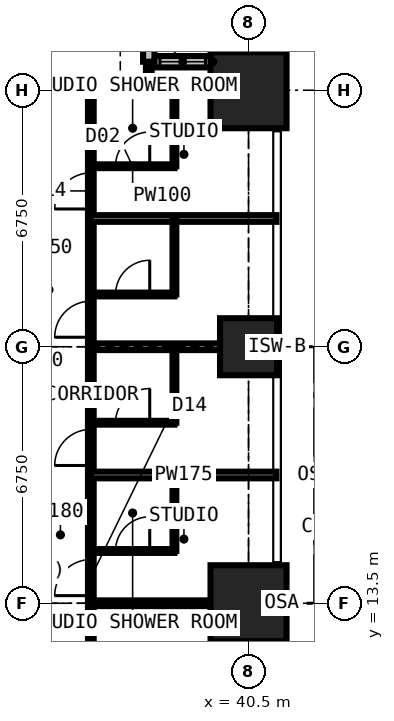
"""IFC4 building model, lengths in metres.
Left out: names, types, materials, properties, quantities, classifications, styles, units other than length and angle.
Written with IfcOpenShell. Run it as: python <this file> out.ifc"""

import sys

from ifc_helpers import new_model, si_unit, direction, frame, frame_2d, origin, origin_2d, place, context, subcontext, project, spatial, rectangle, extrude, element, fill, save


model = new_model("IFC4")
c1 = context("Model", 3, precision=1e-05, world=origin(), true_north=direction((0.0, 1.0)))
c2 = subcontext(c1, "Body", "Model", "MODEL_VIEW")
j1 = project(units=[si_unit("LENGTHUNIT", "METRE"), si_unit("PLANEANGLEUNIT", "RADIAN")], contexts=[c1])
p1 = place(None, origin())
s1 = spatial("IfcSite", under=j1, at=p1, CompositionType="ELEMENT")
p2 = place(p1, origin())
s2 = spatial("IfcBuilding", under=s1, at=p2, CompositionType="ELEMENT")
p3 = place(p2, frame((0.0, 0.0, 134.1)))
s3 = spatial("IfcBuildingStorey", under=s2, at=p3, CompositionType="ELEMENT", Elevation=134.1)
p4 = place(p3, frame((40.5, 13.5, 0.0), z_axis=(0.0, 0.0, 1.0), x_axis=(1.0, 0.0, 0.0)))
e1 = element("IfcColumn", 1, at=p4, inside=s3, PredefinedType="COLUMN", context=c2, shape_type="SweptSolid", body=[
    extrude(rectangle(XDim=2.0, YDim=2.0, at=origin_2d()), origin(), (0.0, 0.0, 1.0), 3.6),
])
p5 = place(p3, frame((40.5, 20.25, 0.0), z_axis=(0.0, 0.0, 1.0), x_axis=(1.0, 0.0, 0.0)))
e2 = element("IfcColumn", 2, at=p5, inside=s3, PredefinedType="COLUMN", context=c2, shape_type="SweptSolid", body=[
    extrude(rectangle(XDim=1.5, YDim=1.5, at=origin_2d()), origin(), (0.0, 0.0, 1.0), 3.6),
])
p6 = place(p3, frame((40.5, 27.0, 0.0), z_axis=(0.0, 0.0, 1.0), x_axis=(1.0, 0.0, 0.0)))
e3 = element("IfcColumn", 3, at=p6, inside=s3, PredefinedType="COLUMN", context=c2, shape_type="SweptSolid", body=[
    extrude(rectangle(XDim=2.0, YDim=2.0, at=origin_2d()), origin(), (0.0, 0.0, 1.0), 3.6),
])
p7 = place(p3, frame((41.25, 27.75, 0.0), z_axis=(0.0, 0.0, 1.0), x_axis=(-1.0, 0.0, 0.0)))
e4 = element("IfcWall", 4, at=p7, inside=s3, PredefinedType="SOLIDWALL", context=c2, shape_type="SweptSolid", body=[
    extrude(rectangle(XDim=3.375, YDim=0.3, at=frame_2d((1.688, 0.0))), origin(), (0.0, 0.0, 1.0), 3.3),
])
p8 = place(p7, frame((1.883, 0.0, 0.9)))
e5 = element("IfcOpeningElement", 5, at=p8, cuts=e4, PredefinedType="OPENING", context=c2, shape_type="SweptSolid", body=[
    extrude(rectangle(XDim=1.2, YDim=1.8, at=frame_2d((0.6, 0.9))), frame((0.0, 0.16, 0.0), z_axis=(0.0, -1.0, 0.0), x_axis=(1.0, 0.0, 0.0)), (0.0, 0.0, 1.0), 0.32),
])
p9 = place(p3, frame((37.875, 27.75, 0.0), z_axis=(0.0, 0.0, 1.0), x_axis=(0.0, 1.0, 0.0)))
e6 = element("IfcWall", 6, at=p9, inside=s3, PredefinedType="SOLIDWALL", context=c2, shape_type="SweptSolid", body=[
    extrude(rectangle(XDim=3.375, YDim=0.3, at=frame_2d((1.688, 0.0))), origin(), (0.0, 0.0, 1.0), 3.3),
])
p10 = place(p9, frame((0.788, 0.0, 0.6)))
e7 = element("IfcOpeningElement", 7, at=p10, cuts=e6, PredefinedType="OPENING", context=c2, shape_type="SweptSolid", body=[
    extrude(rectangle(XDim=1.8, YDim=2.1, at=frame_2d((0.9, 1.05))), frame((0.0, 0.16, 0.0), z_axis=(0.0, -1.0, 0.0), x_axis=(1.0, 0.0, 0.0)), (0.0, 0.0, 1.0), 0.32),
])
p11 = place(p3, frame((36.35, 6.75, 0.0), z_axis=(0.0, 0.0, 1.0), x_axis=(0.0, 1.0, 0.0)))
e8 = element("IfcWall", 8, at=p11, inside=s3, PredefinedType="PARTITIONING", context=c2, shape_type="SweptSolid", body=[
    extrude(rectangle(XDim=20.25, YDim=0.15, at=frame_2d((10.125, 0.0))), origin(), (0.0, 0.0, 1.0), 3.3),
])
p12 = place(p11, frame((6.95, 0.0, 0.0)))
e9 = element("IfcOpeningElement", 9, at=p12, cuts=e8, PredefinedType="OPENING", context=c2, shape_type="SweptSolid", body=[
    extrude(rectangle(XDim=0.95, YDim=2.2, at=frame_2d((0.475, 1.1))), frame((0.0, 0.085, 0.0), z_axis=(0.0, -1.0, 0.0), x_axis=(1.0, 0.0, 0.0)), (0.0, 0.0, 1.0), 0.17),
])
p13 = place(p11, frame((10.375, 0.0, 0.0)))
e10 = element("IfcOpeningElement", 10, at=p13, cuts=e8, PredefinedType="OPENING", context=c2, shape_type="SweptSolid", body=[
    extrude(rectangle(XDim=0.95, YDim=2.2, at=frame_2d((0.475, 1.1))), frame((0.0, 0.085, 0.0), z_axis=(0.0, -1.0, 0.0), x_axis=(1.0, 0.0, 0.0)), (0.0, 0.0, 1.0), 0.17),
])
p14 = place(p11, frame((13.75, 0.0, 0.0)))
e11 = element("IfcOpeningElement", 11, at=p14, cuts=e8, PredefinedType="OPENING", context=c2, shape_type="SweptSolid", body=[
    extrude(rectangle(XDim=0.95, YDim=2.2, at=frame_2d((0.475, 1.1))), frame((0.0, 0.085, 0.0), z_axis=(0.0, -1.0, 0.0), x_axis=(1.0, 0.0, 0.0)), (0.0, 0.0, 1.0), 0.17),
])
p15 = place(p11, frame((17.125, 0.0, 0.0)))
e12 = element("IfcOpeningElement", 12, at=p15, cuts=e8, PredefinedType="OPENING", context=c2, shape_type="SweptSolid", body=[
    extrude(rectangle(XDim=0.95, YDim=2.2, at=frame_2d((0.475, 1.1))), frame((0.0, 0.085, 0.0), z_axis=(0.0, -1.0, 0.0), x_axis=(1.0, 0.0, 0.0)), (0.0, 0.0, 1.0), 0.17),
])
p16 = place(p3, frame((36.35, 13.5, 0.0), z_axis=(0.0, 0.0, 1.0), x_axis=(1.0, 0.0, 0.0)))
e13 = element("IfcWall", 13, at=p16, inside=s3, PredefinedType="PARTITIONING", context=c2, shape_type="SweptSolid", body=[
    extrude(rectangle(XDim=4.884, YDim=0.15, at=frame_2d((2.442, 0.0))), origin(), (0.0, 0.0, 1.0), 2.802),
])
p17 = place(p3, frame((36.35, 14.875, 0.0), z_axis=(0.0, 0.0, 1.0), x_axis=(1.0, 0.0, 0.0)))
e14 = element("IfcWall", 14, at=p17, inside=s3, PredefinedType="PARTITIONING", context=c2, shape_type="SweptSolid", body=[
    extrude(rectangle(XDim=2.2, YDim=0.1, at=frame_2d((1.1, 0.0))), origin(), (0.0, 0.0, 1.0), 3.3),
])
p18 = place(p17, frame((0.65, 0.0, 0.0)))
e15 = element("IfcOpeningElement", 15, at=p18, cuts=e14, PredefinedType="OPENING", context=c2, shape_type="SweptSolid", body=[
    extrude(rectangle(XDim=0.9, YDim=2.2, at=frame_2d((0.45, 1.1))), frame((0.0, 0.06, 0.0), z_axis=(0.0, -1.0, 0.0), x_axis=(1.0, 0.0, 0.0)), (0.0, 0.0, 1.0), 0.12),
])
p19 = place(p3, frame((36.35, 16.875, 0.0), z_axis=(0.0, 0.0, 1.0), x_axis=(1.0, 0.0, 0.0)))
e16 = element("IfcWall", 16, at=p19, inside=s3, PredefinedType="PARTITIONING", context=c2, shape_type="SweptSolid", body=[
    extrude(rectangle(XDim=4.884, YDim=0.175, at=frame_2d((2.442, 0.0))), origin(), (0.0, 0.0, 1.0), 3.3),
])
p20 = place(p3, frame((36.35, 18.25, 0.0), z_axis=(0.0, 0.0, 1.0), x_axis=(1.0, 0.0, 0.0)))
e17 = element("IfcWall", 17, at=p20, inside=s3, PredefinedType="PARTITIONING", context=c2, shape_type="SweptSolid", body=[
    extrude(rectangle(XDim=2.2, YDim=0.1, at=frame_2d((1.1, 0.0))), origin(), (0.0, 0.0, 1.0), 3.3),
])
p21 = place(p20, frame((0.65, 0.0, 0.0)))
e18 = element("IfcOpeningElement", 18, at=p21, cuts=e17, PredefinedType="OPENING", context=c2, shape_type="SweptSolid", body=[
    extrude(rectangle(XDim=0.9, YDim=2.2, at=frame_2d((0.45, 1.1))), frame((0.0, 0.06, 0.0), z_axis=(0.0, -1.0, 0.0), x_axis=(1.0, 0.0, 0.0)), (0.0, 0.0, 1.0), 0.12),
])
p22 = place(p3, frame((36.35, 20.25, 0.0), z_axis=(0.0, 0.0, 1.0), x_axis=(1.0, 0.0, 0.0)))
e19 = element("IfcWall", 19, at=p22, inside=s3, PredefinedType="PARTITIONING", context=c2, shape_type="SweptSolid", body=[
    extrude(rectangle(XDim=4.884, YDim=0.175, at=frame_2d((2.442, 0.0))), origin(), (0.0, 0.0, 1.0), 2.802),
])
p23 = place(p3, frame((36.35, 21.625, 0.0), z_axis=(0.0, 0.0, 1.0), x_axis=(1.0, 0.0, 0.0)))
e20 = element("IfcWall", 20, at=p23, inside=s3, PredefinedType="PARTITIONING", context=c2, shape_type="SweptSolid", body=[
    extrude(rectangle(XDim=2.2, YDim=0.1, at=frame_2d((1.1, 0.0))), origin(), (0.0, 0.0, 1.0), 3.3),
])
p24 = place(p23, frame((0.65, 0.0, 0.0)))
e21 = element("IfcOpeningElement", 21, at=p24, cuts=e20, PredefinedType="OPENING", context=c2, shape_type="SweptSolid", body=[
    extrude(rectangle(XDim=0.9, YDim=2.2, at=frame_2d((0.45, 1.1))), frame((0.0, 0.06, 0.0), z_axis=(0.0, -1.0, 0.0), x_axis=(1.0, 0.0, 0.0)), (0.0, 0.0, 1.0), 0.12),
])
p25 = place(p3, frame((36.35, 23.625, 0.0), z_axis=(0.0, 0.0, 1.0), x_axis=(1.0, 0.0, 0.0)))
e22 = element("IfcWall", 22, at=p25, inside=s3, PredefinedType="PARTITIONING", context=c2, shape_type="SweptSolid", body=[
    extrude(rectangle(XDim=4.884, YDim=0.175, at=frame_2d((2.442, 0.0))), origin(), (0.0, 0.0, 1.0), 3.3),
])
p26 = place(p3, frame((36.35, 25.0, 0.0), z_axis=(0.0, 0.0, 1.0), x_axis=(1.0, 0.0, 0.0)))
e23 = element("IfcWall", 23, at=p26, inside=s3, PredefinedType="PARTITIONING", context=c2, shape_type="SweptSolid", body=[
    extrude(rectangle(XDim=2.2, YDim=0.1, at=frame_2d((1.1, 0.0))), origin(), (0.0, 0.0, 1.0), 3.3),
])
p27 = place(p26, frame((0.65, 0.0, 0.0)))
e24 = element("IfcOpeningElement", 24, at=p27, cuts=e23, PredefinedType="OPENING", context=c2, shape_type="SweptSolid", body=[
    extrude(rectangle(XDim=0.9, YDim=2.2, at=frame_2d((0.45, 1.1))), frame((0.0, 0.06, 0.0), z_axis=(0.0, -1.0, 0.0), x_axis=(1.0, 0.0, 0.0)), (0.0, 0.0, 1.0), 0.12),
])
p28 = place(p3, frame((36.35, 27.0, 0.0), z_axis=(0.0, 0.0, 1.0), x_axis=(1.0, 0.0, 0.0)))
e25 = element("IfcWall", 25, at=p28, inside=s3, PredefinedType="PARTITIONING", context=c2, shape_type="SweptSolid", body=[
    extrude(rectangle(XDim=4.884, YDim=0.175, at=frame_2d((2.442, 0.0))), origin(), (0.0, 0.0, 1.0), 2.802),
])
p29 = place(p3, frame((37.875, 27.0, 0.0), z_axis=(0.0, 0.0, 1.0), x_axis=(0.0, 1.0, 0.0)))
e26 = element("IfcWall", 26, at=p29, inside=s3, PredefinedType="PARTITIONING", context=c2, shape_type="SweptSolid", body=[
    extrude(rectangle(XDim=0.734, YDim=0.15, at=frame_2d((0.367, 0.0))), origin(), (0.0, 0.0, 1.0), 3.3),
])
for number, where, z_axis, x_axis in (
    (27, (38.55, 14.875, 0.0), (0.0, 0.0, 1.0), (0.0, 1.0, 0.0)),
    (28, (38.55, 18.25, 0.0), (0.0, 0.0, 1.0), (0.0, 1.0, 0.0)),
    (29, (38.55, 21.625, 0.0), (0.0, 0.0, 1.0), (0.0, 1.0, 0.0)),
    (30, (38.55, 25.0, 0.0), (0.0, 0.0, 1.0), (0.0, 1.0, 0.0)),
):
    element("IfcWall", number, at=place(p3, frame(where, z_axis=z_axis, x_axis=x_axis)), inside=s3, PredefinedType="PARTITIONING", context=c2, shape_type="SweptSolid", body=[
        extrude(rectangle(XDim=2.0, YDim=0.1, at=frame_2d((1.0, 0.0))), origin(), (0.0, 0.0, 1.0), 3.3),
    ])
p30 = place(p8, origin())
e31 = element("IfcWindow", 31, at=p30, inside=s3, PartitioningType="SINGLE_PANEL", PredefinedType="WINDOW", context=c2, shape_type="SweptSolid", body=[
    extrude(rectangle(XDim=1.2, YDim=1.8, at=frame_2d((0.6, 0.9))), frame((0.0, 0.03, 0.0), z_axis=(0.0, -1.0, 0.0), x_axis=(1.0, 0.0, 0.0)), (0.0, 0.0, 1.0), 0.06),
])
fill(e5, e31)
p31 = place(p12, origin())
e32 = element("IfcDoor", 32, at=p31, inside=s3, OperationType="SINGLE_SWING_LEFT", PredefinedType="DOOR", context=c2, shape_type="SweptSolid", body=[
    extrude(rectangle(XDim=0.95, YDim=2.2, at=frame_2d((0.475, 1.1))), frame((0.0, 0.025, 0.0), z_axis=(0.0, -1.0, 0.0), x_axis=(1.0, 0.0, 0.0)), (0.0, 0.0, 1.0), 0.05),
])
fill(e9, e32)
p32 = place(p18, origin())
e33 = element("IfcDoor", 33, at=p32, inside=s3, OperationType="SINGLE_SWING_RIGHT", PredefinedType="DOOR", context=c2, shape_type="SweptSolid", body=[
    extrude(rectangle(XDim=0.9, YDim=2.2, at=frame_2d((0.45, 1.1))), frame((0.0, 0.025, 0.0), z_axis=(0.0, -1.0, 0.0), x_axis=(1.0, 0.0, 0.0)), (0.0, 0.0, 1.0), 0.05),
])
fill(e15, e33)
p33 = place(p13, origin())
e34 = element("IfcDoor", 34, at=p33, inside=s3, OperationType="SINGLE_SWING_LEFT", PredefinedType="DOOR", context=c2, shape_type="SweptSolid", body=[
    extrude(rectangle(XDim=0.95, YDim=2.2, at=frame_2d((0.475, 1.1))), frame((0.0, 0.025, 0.0), z_axis=(0.0, -1.0, 0.0), x_axis=(1.0, 0.0, 0.0)), (0.0, 0.0, 1.0), 0.05),
])
fill(e10, e34)
p34 = place(p21, origin())
e35 = element("IfcDoor", 35, at=p34, inside=s3, OperationType="SINGLE_SWING_RIGHT", PredefinedType="DOOR", context=c2, shape_type="SweptSolid", body=[
    extrude(rectangle(XDim=0.9, YDim=2.2, at=frame_2d((0.45, 1.1))), frame((0.0, 0.025, 0.0), z_axis=(0.0, -1.0, 0.0), x_axis=(1.0, 0.0, 0.0)), (0.0, 0.0, 1.0), 0.05),
])
fill(e18, e35)
p35 = place(p14, origin())
e36 = element("IfcDoor", 36, at=p35, inside=s3, OperationType="SINGLE_SWING_LEFT", PredefinedType="DOOR", context=c2, shape_type="SweptSolid", body=[
    extrude(rectangle(XDim=0.95, YDim=2.2, at=frame_2d((0.475, 1.1))), frame((0.0, 0.025, 0.0), z_axis=(0.0, -1.0, 0.0), x_axis=(1.0, 0.0, 0.0)), (0.0, 0.0, 1.0), 0.05),
])
fill(e11, e36)
p36 = place(p24, origin())
e37 = element("IfcDoor", 37, at=p36, inside=s3, OperationType="SINGLE_SWING_RIGHT", PredefinedType="DOOR", context=c2, shape_type="SweptSolid", body=[
    extrude(rectangle(XDim=0.9, YDim=2.2, at=frame_2d((0.45, 1.1))), frame((0.0, 0.025, 0.0), z_axis=(0.0, -1.0, 0.0), x_axis=(1.0, 0.0, 0.0)), (0.0, 0.0, 1.0), 0.05),
])
fill(e21, e37)
p37 = place(p15, origin())
e38 = element("IfcDoor", 38, at=p37, inside=s3, OperationType="SINGLE_SWING_LEFT", PredefinedType="DOOR", context=c2, shape_type="SweptSolid", body=[
    extrude(rectangle(XDim=0.95, YDim=2.2, at=frame_2d((0.475, 1.1))), frame((0.0, 0.025, 0.0), z_axis=(0.0, -1.0, 0.0), x_axis=(1.0, 0.0, 0.0)), (0.0, 0.0, 1.0), 0.05),
])
fill(e12, e38)
p38 = place(p27, origin())
e39 = element("IfcDoor", 39, at=p38, inside=s3, OperationType="SINGLE_SWING_RIGHT", PredefinedType="DOOR", context=c2, shape_type="SweptSolid", body=[
    extrude(rectangle(XDim=0.9, YDim=2.2, at=frame_2d((0.45, 1.1))), frame((0.0, 0.025, 0.0), z_axis=(0.0, -1.0, 0.0), x_axis=(1.0, 0.0, 0.0)), (0.0, 0.0, 1.0), 0.05),
])
fill(e24, e39)
save(model, sys.argv[1])
